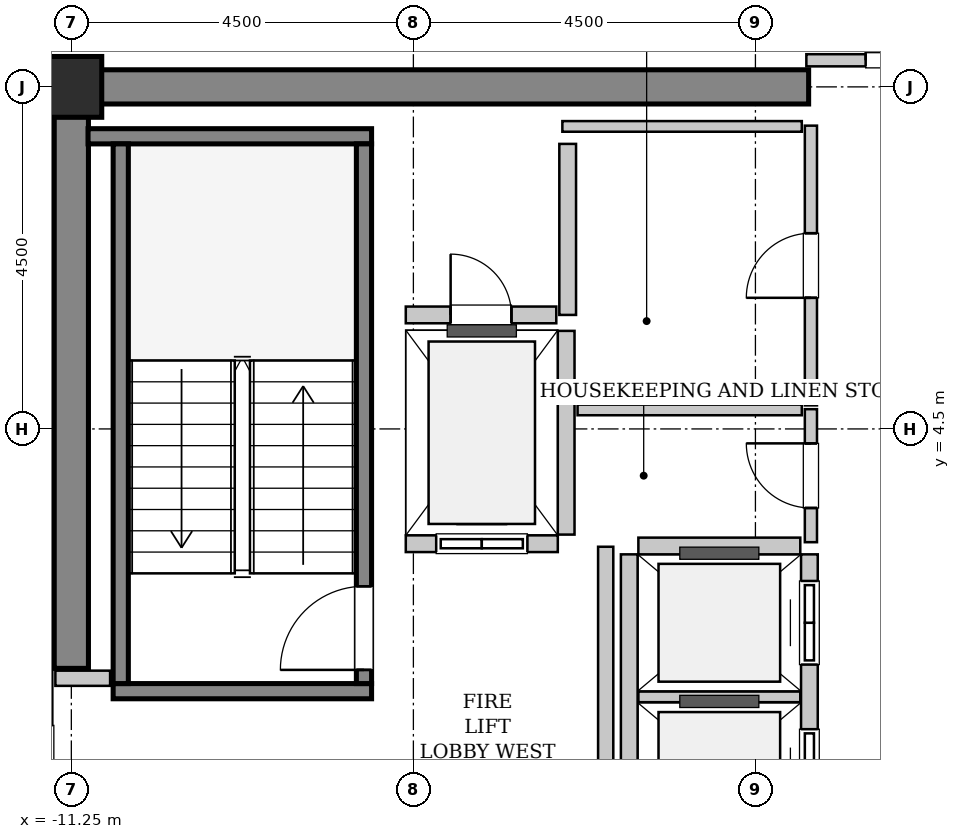
"""IFC4 building model, lengths in metres.
Left out: names, types, materials, properties, quantities, classifications, styles, units other than length and angle.
Written with IfcOpenShell. Run it as: python <this file> out.ifc"""

import sys

from ifc_helpers import new_model, si_unit, direction, frame, frame_2d, origin, origin_2d, place, context, subcontext, project, spatial, rectangle, hollow_rectangle, extrude, source, transform, mapped, element, fill, save


model = new_model("IFC4")
c1 = context("Model", 3, precision=1e-05, world=origin(), true_north=direction((0.0, 1.0)))
c2 = subcontext(c1, "Body", "Model", "MODEL_VIEW")
j1 = project(units=[si_unit("LENGTHUNIT", "METRE"), si_unit("PLANEANGLEUNIT", "RADIAN")], contexts=[c1])
p1 = place(None, origin())
s1 = spatial("IfcSite", under=j1, at=p1, CompositionType="ELEMENT")
p2 = place(p1, origin())
s2 = spatial("IfcBuilding", under=s1, at=p2, CompositionType="ELEMENT")
p3 = place(p2, frame((0.0, 0.0, 268.4)))
s3 = spatial("IfcBuildingStorey", under=s2, at=p3, CompositionType="ELEMENT", Elevation=268.4)
m1 = source(origin(), c2, "Body", "SweptSolid", [
    extrude(rectangle(XDim=9.925, YDim=0.45, at=frame_2d((4.962, 0.0))), origin(), (0.0, 0.0, 1.0), 3.8),
])
p4 = place(p3, frame((-11.475, 9.0, 0.0), z_axis=(0.0, 0.0, 1.0), x_axis=(1.0, 0.0, 0.0)))
e1 = element("IfcWall", 1, at=p4, inside=s3, PredefinedType="SHEAR", context=c2, shape_type="MappedRepresentation", body=[
    mapped(m1, transform((0.0, 0.0, 0.0), x_axis=(1.0, 0.0, 0.0), y_axis=(0.0, 1.0, 0.0), z_axis=(0.0, 0.0, 1.0), scale=1.0)),
])
m2 = source(origin(), c2, "Body", "SweptSolid", [
    extrude(rectangle(XDim=7.425, YDim=0.45, at=frame_2d((3.712, 0.0))), origin(), (0.0, 0.0, 1.0), 3.8),
])
p5 = place(p3, frame((-11.25, 1.35, 0.0), z_axis=(0.0, 0.0, 1.0), x_axis=(0.0, 1.0, 0.0)))
e2 = element("IfcWall", 2, at=p5, inside=s3, PredefinedType="SHEAR", context=c2, shape_type="MappedRepresentation", body=[
    mapped(m2, transform((0.0, 0.0, 0.0), x_axis=(1.0, 0.0, 0.0), y_axis=(0.0, 1.0, 0.0), z_axis=(0.0, 0.0, 1.0), scale=1.0)),
])
m3 = source(origin(), c2, "Body", "SweptSolid", [
    extrude(hollow_rectangle(XDim=0.8, YDim=0.8, WallThickness=0.04, InnerFilletRadius=0.04, OuterFilletRadius=0.08, at=origin_2d()), origin(), (0.0, 0.0, 1.0), 3.8),
])
p6 = place(p3, frame((-11.25, 9.0, 0.0), z_axis=(0.0, 0.0, 1.0), x_axis=(1.0, 0.0, 0.0)))
e3 = element("IfcColumn", 3, at=p6, inside=s3, PredefinedType="COLUMN", context=c2, shape_type="MappedRepresentation", body=[
    mapped(m3, transform((0.0, 0.0, 0.0), x_axis=(1.0, 0.0, 0.0), y_axis=(0.0, 1.0, 0.0), z_axis=(0.0, 0.0, 1.0), scale=1.0)),
])
m4 = source(origin(), c2, "Body", "SweptSolid", [
    extrude(rectangle(XDim=3.4, YDim=0.2, at=frame_2d((1.7, 0.0))), origin(), (0.0, 0.0, 1.0), 3.8),
])
p7 = place(p3, frame((-7.3, 1.05, 0.0), z_axis=(0.0, 0.0, 1.0), x_axis=(-1.0, 0.0, 0.0)))
e4 = element("IfcWall", 4, at=p7, inside=s3, PredefinedType="SOLIDWALL", context=c2, shape_type="MappedRepresentation", body=[
    mapped(m4, transform((0.0, 0.0, 0.0), x_axis=(1.0, 0.0, 0.0), y_axis=(0.0, 1.0, 0.0), z_axis=(0.0, 0.0, 1.0), scale=1.0)),
])
m5 = source(origin(), c2, "Body", "SweptSolid", [
    extrude(rectangle(XDim=3.73, YDim=0.2, at=frame_2d((1.865, 0.0))), origin(), (0.0, 0.0, 1.0), 3.8),
])
p8 = place(p3, frame((-7.3, 8.35, 0.0), z_axis=(0.0, 0.0, 1.0), x_axis=(-1.0, 0.0, 0.0)))
e5 = element("IfcWall", 5, at=p8, inside=s3, PredefinedType="SOLIDWALL", context=c2, shape_type="MappedRepresentation", body=[
    mapped(m5, transform((0.0, 0.0, 0.0), x_axis=(1.0, 0.0, 0.0), y_axis=(0.0, 1.0, 0.0), z_axis=(0.0, 0.0, 1.0), scale=1.0)),
])
m6 = source(origin(), c2, "Body", "SweptSolid", [
    extrude(rectangle(XDim=7.1, YDim=0.2, at=frame_2d((3.55, 0.0))), origin(), (0.0, 0.0, 1.0), 3.8),
])
p9 = place(p3, frame((-7.4, 1.15, 0.0), z_axis=(0.0, 0.0, 1.0), x_axis=(0.0, 1.0, 0.0)))
e6 = element("IfcWall", 6, at=p9, inside=s3, PredefinedType="SOLIDWALL", context=c2, shape_type="MappedRepresentation", body=[
    mapped(m6, transform((0.0, 0.0, 0.0), x_axis=(1.0, 0.0, 0.0), y_axis=(0.0, 1.0, 0.0), z_axis=(0.0, 0.0, 1.0), scale=1.0)),
])
p10 = place(p9, frame((0.18, 0.0, 0.0)))
e7 = element("IfcOpeningElement", 7, at=p10, cuts=e6, PredefinedType="OPENING", context=c2, shape_type="SweptSolid", body=[
    extrude(rectangle(XDim=1.1, YDim=2.15, at=frame_2d((0.55, 1.075))), frame((0.0, 0.11, 0.0), z_axis=(0.0, -1.0, 0.0), x_axis=(1.0, 0.0, 0.0)), (0.0, 0.0, 1.0), 0.22),
])
p11 = place(p3, frame((-10.6, 1.15, 0.0), z_axis=(0.0, 0.0, 1.0), x_axis=(0.0, 1.0, 0.0)))
e8 = element("IfcWall", 8, at=p11, inside=s3, PredefinedType="SOLIDWALL", context=c2, shape_type="MappedRepresentation", body=[
    mapped(m6, transform((0.0, 0.0, 0.0), x_axis=(1.0, 0.0, 0.0), y_axis=(0.0, 1.0, 0.0), z_axis=(0.0, 0.0, 1.0), scale=1.0)),
])
m7 = source(origin(), c2, "Body", "SweptSolid", [
    extrude(rectangle(XDim=2.0, YDim=0.22, at=frame_2d((1.0, 0.0))), origin(), (0.0, 0.0, 1.0), 3.535),
])
p12 = place(p3, frame((-6.85, 2.99, 0.0), z_axis=(0.0, 0.0, 1.0), x_axis=(1.0, 0.0, 0.0)))
e9 = element("IfcWall", 9, at=p12, inside=s3, PredefinedType="SOLIDWALL", context=c2, shape_type="MappedRepresentation", body=[
    mapped(m7, transform((0.0, 0.0, 0.0), x_axis=(1.0, 0.0, 0.0), y_axis=(0.0, 1.0, 0.0), z_axis=(0.0, 0.0, 1.0), scale=1.0)),
])
p13 = place(p12, frame((0.4, 0.0, 0.0)))
e10 = element("IfcOpeningElement", 10, at=p13, cuts=e9, PredefinedType="OPENING", context=c2, shape_type="SweptSolid", body=[
    extrude(rectangle(XDim=1.2, YDim=2.2, at=frame_2d((0.6, 1.1))), frame((0.0, 0.12, 0.0), z_axis=(0.0, -1.0, 0.0), x_axis=(1.0, 0.0, 0.0)), (0.0, 0.0, 1.0), 0.24),
])
m8 = source(origin(), c2, "Body", "SweptSolid", [
    extrude(rectangle(XDim=2.68, YDim=0.22, at=frame_2d((1.34, 0.0))), origin(), (0.0, 0.0, 1.0), 3.535),
])
p14 = place(p3, frame((-4.74, 3.11, 0.0), z_axis=(0.0, 0.0, 1.0), x_axis=(0.0, 1.0, 0.0)))
e11 = element("IfcWall", 11, at=p14, inside=s3, PredefinedType="SOLIDWALL", context=c2, shape_type="MappedRepresentation", body=[
    mapped(m8, transform((0.0, 0.0, 0.0), x_axis=(1.0, 0.0, 0.0), y_axis=(0.0, 1.0, 0.0), z_axis=(0.0, 0.0, 1.0), scale=1.0)),
])
m9 = source(origin(), c2, "Body", "SweptSolid", [
    extrude(rectangle(XDim=5.7, YDim=0.22, at=frame_2d((2.85, 0.0))), origin(), (0.0, 0.0, 1.0), 3.535),
])
p15 = place(p3, frame((-1.54, -2.85, 0.0), z_axis=(0.0, 0.0, 1.0), x_axis=(0.0, 1.0, 0.0)))
e12 = element("IfcWall", 12, at=p15, inside=s3, PredefinedType="SOLIDWALL", context=c2, shape_type="MappedRepresentation", body=[
    mapped(m9, transform((0.0, 0.0, 0.0), x_axis=(1.0, 0.0, 0.0), y_axis=(0.0, 1.0, 0.0), z_axis=(0.0, 0.0, 1.0), scale=1.0)),
])
p16 = place(p15, frame((0.35, 0.0, 0.0)))
e13 = element("IfcOpeningElement", 13, at=p16, cuts=e12, PredefinedType="OPENING", context=c2, shape_type="SweptSolid", body=[
    extrude(rectangle(XDim=1.1, YDim=2.2, at=frame_2d((0.55, 1.1))), frame((0.0, 0.12, 0.0), z_axis=(0.0, -1.0, 0.0), x_axis=(1.0, 0.0, 0.0)), (0.0, 0.0, 1.0), 0.24),
])
p17 = place(p15, frame((2.3, 0.0, 0.0)))
e14 = element("IfcOpeningElement", 14, at=p17, cuts=e12, PredefinedType="OPENING", context=c2, shape_type="SweptSolid", body=[
    extrude(rectangle(XDim=1.1, YDim=2.2, at=frame_2d((0.55, 1.1))), frame((0.0, 0.12, 0.0), z_axis=(0.0, -1.0, 0.0), x_axis=(1.0, 0.0, 0.0)), (0.0, 0.0, 1.0), 0.24),
])
p18 = place(p15, frame((4.25, 0.0, 0.0)))
e15 = element("IfcOpeningElement", 15, at=p18, cuts=e12, PredefinedType="OPENING", context=c2, shape_type="SweptSolid", body=[
    extrude(rectangle(XDim=1.1, YDim=2.2, at=frame_2d((0.55, 1.1))), frame((0.0, 0.12, 0.0), z_axis=(0.0, -1.0, 0.0), x_axis=(1.0, 0.0, 0.0)), (0.0, 0.0, 1.0), 0.24),
])
p19 = place(p3, frame((-3.91, 2.85, 0.0), z_axis=(0.0, 0.0, 1.0), x_axis=(0.0, -1.0, 0.0)))
e16 = element("IfcWall", 16, at=p19, inside=s3, PredefinedType="SOLIDWALL", context=c2, shape_type="MappedRepresentation", body=[
    mapped(m9, transform((0.0, 0.0, 0.0), x_axis=(1.0, 0.0, 0.0), y_axis=(0.0, 1.0, 0.0), z_axis=(0.0, 0.0, 1.0), scale=1.0)),
])
m10 = source(origin(), c2, "Body", "SweptSolid", [
    extrude(rectangle(XDim=2.13, YDim=0.14, at=frame_2d((1.065, 0.0))), origin(), (0.0, 0.0, 1.0), 3.535),
])
p20 = place(p3, frame((-3.79, 0.975, 0.0), z_axis=(0.0, 0.0, 1.0), x_axis=(1.0, 0.0, 0.0)))
e17 = element("IfcWall", 17, at=p20, inside=s3, PredefinedType="PARTITIONING", context=c2, shape_type="MappedRepresentation", body=[
    mapped(m10, transform((0.0, 0.0, 0.0), x_axis=(1.0, 0.0, 0.0), y_axis=(0.0, 1.0, 0.0), z_axis=(0.0, 0.0, 1.0), scale=1.0)),
])
m11 = source(origin(), c2, "Body", "SweptSolid", [
    extrude(rectangle(XDim=2.13, YDim=0.22, at=frame_2d((1.065, 0.0))), origin(), (0.0, 0.0, 1.0), 3.535),
])
p21 = place(p3, frame((-1.66, 2.96, 0.0), z_axis=(0.0, 0.0, 1.0), x_axis=(-1.0, 0.0, 0.0)))
e18 = element("IfcWall", 18, at=p21, inside=s3, PredefinedType="SOLIDWALL", context=c2, shape_type="MappedRepresentation", body=[
    mapped(m11, transform((0.0, 0.0, 0.0), x_axis=(1.0, 0.0, 0.0), y_axis=(0.0, 1.0, 0.0), z_axis=(0.0, 0.0, 1.0), scale=1.0)),
])
m12 = source(origin(), c2, "Body", "SweptSolid", [
    extrude(rectangle(XDim=2.25, YDim=0.22, at=frame_2d((1.125, 0.0))), origin(), (0.0, 0.0, 1.0), 3.535),
])
p22 = place(p3, frame((-4.72, 6.0, 0.0), z_axis=(0.0, 0.0, 1.0), x_axis=(0.0, 1.0, 0.0)))
e19 = element("IfcWall", 19, at=p22, inside=s3, PredefinedType="SOLIDWALL", context=c2, shape_type="MappedRepresentation", body=[
    mapped(m12, transform((0.0, 0.0, 0.0), x_axis=(1.0, 0.0, 0.0), y_axis=(0.0, 1.0, 0.0), z_axis=(0.0, 0.0, 1.0), scale=1.0)),
])
m13 = source(origin(), c2, "Body", "SweptSolid", [
    extrude(rectangle(XDim=1.98, YDim=0.22, at=frame_2d((0.99, 0.0))), origin(), (0.0, 0.0, 1.0), 3.535),
])
p23 = place(p3, frame((-6.85, 6.0, 0.0), z_axis=(0.0, 0.0, 1.0), x_axis=(1.0, 0.0, 0.0)))
e20 = element("IfcWall", 20, at=p23, inside=s3, PredefinedType="SOLIDWALL", context=c2, shape_type="MappedRepresentation", body=[
    mapped(m13, transform((0.0, 0.0, 0.0), x_axis=(1.0, 0.0, 0.0), y_axis=(0.0, 1.0, 0.0), z_axis=(0.0, 0.0, 1.0), scale=1.0)),
])
p24 = place(p23, frame((0.59, 0.0, 0.0)))
e21 = element("IfcOpeningElement", 21, at=p24, cuts=e20, PredefinedType="OPENING", context=c2, shape_type="SweptSolid", body=[
    extrude(rectangle(XDim=0.8, YDim=2.0, at=frame_2d((0.4, 1.0))), frame((0.0, 0.12, 0.0), z_axis=(0.0, -1.0, 0.0), x_axis=(1.0, 0.0, 0.0)), (0.0, 0.0, 1.0), 0.24),
])
m14 = source(origin(), c2, "Body", "SweptSolid", [
    extrude(rectangle(XDim=5.9, YDim=0.2, at=frame_2d((2.95, 0.0))), origin(), (0.0, 0.0, 1.0), 3.535),
])
p25 = place(p3, frame((-4.22, -2.95, 0.0), z_axis=(0.0, 0.0, 1.0), x_axis=(0.0, 1.0, 0.0)))
e22 = element("IfcWall", 22, at=p25, inside=s3, PredefinedType="PARTITIONING", context=c2, shape_type="MappedRepresentation", body=[
    mapped(m14, transform((0.0, 0.0, 0.0), x_axis=(1.0, 0.0, 0.0), y_axis=(0.0, 1.0, 0.0), z_axis=(0.0, 0.0, 1.0), scale=1.0)),
])
m15 = source(origin(), c2, "Body", "SweptSolid", [
    extrude(rectangle(XDim=0.72, YDim=0.2, at=frame_2d((0.36, 0.0))), origin(), (0.0, 0.0, 1.0), 3.535),
])
p26 = place(p3, frame((-11.46, 1.22, 0.0), z_axis=(0.0, 0.0, 1.0), x_axis=(1.0, 0.0, 0.0)))
e23 = element("IfcWall", 23, at=p26, inside=s3, PredefinedType="PARTITIONING", context=c2, shape_type="MappedRepresentation", body=[
    mapped(m15, transform((0.0, 0.0, 0.0), x_axis=(1.0, 0.0, 0.0), y_axis=(0.0, 1.0, 0.0), z_axis=(0.0, 0.0, 1.0), scale=1.0)),
])
m16 = source(origin(), c2, "Body", "SweptSolid", [
    extrude(rectangle(XDim=3.16, YDim=0.16, at=frame_2d((1.58, 0.0))), origin(), (0.0, 0.0, 1.0), 2.625),
])
p27 = place(p3, frame((-1.58, 9.35, 0.0), z_axis=(0.0, 0.0, 1.0), x_axis=(1.0, 0.0, 0.0)))
e24 = element("IfcWall", 24, at=p27, inside=s3, PredefinedType="PARTITIONING", context=c2, shape_type="MappedRepresentation", body=[
    mapped(m16, transform((0.0, 0.0, 0.0), x_axis=(1.0, 0.0, 0.0), y_axis=(0.0, 1.0, 0.0), z_axis=(0.0, 0.0, 1.0), scale=1.0)),
])
p28 = place(p27, frame((0.78, 0.0, 0.0)))
e25 = element("IfcOpeningElement", 25, at=p28, cuts=e24, PredefinedType="OPENING", context=c2, shape_type="SweptSolid", body=[
    extrude(rectangle(XDim=1.6, YDim=2.3, at=frame_2d((0.8, 1.15))), frame((0.0, 0.09, 0.0), z_axis=(0.0, -1.0, 0.0), x_axis=(1.0, 0.0, 0.0)), (0.0, 0.0, 1.0), 0.18),
])
m17 = source(origin(), c2, "Body", "SweptSolid", [
    extrude(rectangle(XDim=1.75, YDim=0.16, at=frame_2d((0.875, 0.0))), origin(), (0.0, 0.0, 1.0), 3.535),
])
p29 = place(p3, frame((-1.52, 3.01, 0.0), z_axis=(0.0, 0.0, 1.0), x_axis=(0.0, 1.0, 0.0)))
e26 = element("IfcWall", 26, at=p29, inside=s3, PredefinedType="PARTITIONING", context=c2, shape_type="MappedRepresentation", body=[
    mapped(m17, transform((0.0, 0.0, 0.0), x_axis=(1.0, 0.0, 0.0), y_axis=(0.0, 1.0, 0.0), z_axis=(0.0, 0.0, 1.0), scale=1.0)),
])
p30 = place(p29, frame((0.45, 0.0, 0.0)))
e27 = element("IfcOpeningElement", 27, at=p30, cuts=e26, PredefinedType="OPENING", context=c2, shape_type="SweptSolid", body=[
    extrude(rectangle(XDim=0.85, YDim=2.1, at=frame_2d((0.425, 1.05))), frame((0.0, 0.09, 0.0), z_axis=(0.0, -1.0, 0.0), x_axis=(1.0, 0.0, 0.0)), (0.0, 0.0, 1.0), 0.18),
])
m18 = source(origin(), c2, "Body", "SweptSolid", [
    extrude(rectangle(XDim=2.95, YDim=0.14, at=frame_2d((1.475, 0.0))), origin(), (0.0, 0.0, 1.0), 3.535),
])
p31 = place(p3, frame((-4.59, 4.75, 0.0), z_axis=(0.0, 0.0, 1.0), x_axis=(1.0, 0.0, 0.0)))
e28 = element("IfcWall", 28, at=p31, inside=s3, PredefinedType="PARTITIONING", context=c2, shape_type="MappedRepresentation", body=[
    mapped(m18, transform((0.0, 0.0, 0.0), x_axis=(1.0, 0.0, 0.0), y_axis=(0.0, 1.0, 0.0), z_axis=(0.0, 0.0, 1.0), scale=1.0)),
])
m19 = source(origin(), c2, "Body", "SweptSolid", [
    extrude(rectangle(XDim=3.68, YDim=0.16, at=frame_2d((1.84, 0.0))), origin(), (0.0, 0.0, 1.0), 3.535),
])
p32 = place(p3, frame((-1.52, 4.81, 0.0), z_axis=(0.0, 0.0, 1.0), x_axis=(0.0, 1.0, 0.0)))
e29 = element("IfcWall", 29, at=p32, inside=s3, PredefinedType="PARTITIONING", context=c2, shape_type="MappedRepresentation", body=[
    mapped(m19, transform((0.0, 0.0, 0.0), x_axis=(1.0, 0.0, 0.0), y_axis=(0.0, 1.0, 0.0), z_axis=(0.0, 0.0, 1.0), scale=1.0)),
])
p33 = place(p32, frame((1.415, 0.0, 0.0)))
e30 = element("IfcOpeningElement", 30, at=p33, cuts=e29, PredefinedType="OPENING", context=c2, shape_type="SweptSolid", body=[
    extrude(rectangle(XDim=0.85, YDim=2.1, at=frame_2d((0.425, 1.05))), frame((0.0, 0.09, 0.0), z_axis=(0.0, -1.0, 0.0), x_axis=(1.0, 0.0, 0.0)), (0.0, 0.0, 1.0), 0.18),
])
m20 = source(origin(), c2, "Body", "SweptSolid", [
    extrude(rectangle(XDim=3.15, YDim=0.14, at=frame_2d((1.575, 0.0))), origin(), (0.0, 0.0, 1.0), 3.535),
])
p34 = place(p3, frame((-4.79, 8.48, 0.0), z_axis=(0.0, 0.0, 1.0), x_axis=(1.0, 0.0, 0.0)))
e31 = element("IfcWall", 31, at=p34, inside=s3, PredefinedType="PARTITIONING", context=c2, shape_type="MappedRepresentation", body=[
    mapped(m20, transform((0.0, 0.0, 0.0), x_axis=(1.0, 0.0, 0.0), y_axis=(0.0, 1.0, 0.0), z_axis=(0.0, 0.0, 1.0), scale=1.0)),
])
m21 = source(origin(), c2, "Body", "SweptSolid", [
    extrude(rectangle(XDim=1.1, YDim=2.15, at=frame_2d((0.55, 1.075))), frame((0.0, 0.025, 0.0), z_axis=(0.0, -1.0, 0.0), x_axis=(1.0, 0.0, 0.0)), (0.0, 0.0, 1.0), 0.05),
])
p35 = place(p10, origin())
e32 = element("IfcDoor", 32, at=p35, inside=s3, OperationType="SINGLE_SWING_LEFT", PredefinedType="DOOR", context=c2, shape_type="MappedRepresentation", body=[
    mapped(m21, transform((0.0, 0.0, 0.0), x_axis=(1.0, 0.0, 0.0), y_axis=(0.0, 1.0, 0.0), z_axis=(0.0, 0.0, 1.0), scale=1.0)),
])
fill(e7, e32)
m22 = source(origin(), c2, "Body", "SweptSolid", [
    extrude(rectangle(XDim=1.2, YDim=2.2, at=frame_2d((0.6, 1.1))), frame((0.0, 0.025, 0.0), z_axis=(0.0, -1.0, 0.0), x_axis=(1.0, 0.0, 0.0)), (0.0, 0.0, 1.0), 0.05),
])
p36 = place(p13, origin())
e33 = element("IfcDoor", 33, at=p36, inside=s3, OperationType="SLIDING_TO_LEFT", PredefinedType="DOOR", context=c2, shape_type="MappedRepresentation", body=[
    mapped(m22, transform((0.0, 0.0, 0.0), x_axis=(1.0, 0.0, 0.0), y_axis=(0.0, 1.0, 0.0), z_axis=(0.0, 0.0, 1.0), scale=1.0)),
])
fill(e10, e33)
m23 = source(origin(), c2, "Body", "SweptSolid", [
    extrude(rectangle(XDim=1.1, YDim=2.2, at=frame_2d((0.55, 1.1))), frame((0.0, 0.025, 0.0), z_axis=(0.0, -1.0, 0.0), x_axis=(1.0, 0.0, 0.0)), (0.0, 0.0, 1.0), 0.05),
])
p37 = place(p17, origin())
e34 = element("IfcDoor", 34, at=p37, inside=s3, OperationType="DOUBLE_DOOR_SLIDING", PredefinedType="DOOR", context=c2, shape_type="MappedRepresentation", body=[
    mapped(m23, transform((0.0, 0.0, 0.0), x_axis=(1.0, 0.0, 0.0), y_axis=(0.0, 1.0, 0.0), z_axis=(0.0, 0.0, 1.0), scale=1.0)),
])
fill(e14, e34)
p38 = place(p18, origin())
e35 = element("IfcDoor", 35, at=p38, inside=s3, OperationType="DOUBLE_DOOR_SLIDING", PredefinedType="DOOR", context=c2, shape_type="MappedRepresentation", body=[
    mapped(m23, transform((0.0, 0.0, 0.0), x_axis=(1.0, 0.0, 0.0), y_axis=(0.0, 1.0, 0.0), z_axis=(0.0, 0.0, 1.0), scale=1.0)),
])
fill(e15, e35)
m24 = source(origin(), c2, "Body", "SweptSolid", [
    extrude(rectangle(XDim=0.8, YDim=2.0, at=frame_2d((0.4, 1.0))), frame((0.0, 0.025, 0.0), z_axis=(0.0, -1.0, 0.0), x_axis=(1.0, 0.0, 0.0)), (0.0, 0.0, 1.0), 0.05),
])
p39 = place(p24, origin())
e36 = element("IfcDoor", 36, at=p39, inside=s3, OperationType="SINGLE_SWING_LEFT", PredefinedType="TRAPDOOR", context=c2, shape_type="MappedRepresentation", body=[
    mapped(m24, transform((0.0, 0.0, 0.0), x_axis=(1.0, 0.0, 0.0), y_axis=(0.0, 1.0, 0.0), z_axis=(0.0, 0.0, 1.0), scale=1.0)),
])
fill(e21, e36)
m25 = source(origin(), c2, "Body", "SweptSolid", [
    extrude(rectangle(XDim=1.6, YDim=2.3, at=frame_2d((0.8, 1.15))), frame((0.0, 0.025, 0.0), z_axis=(0.0, -1.0, 0.0), x_axis=(1.0, 0.0, 0.0)), (0.0, 0.0, 1.0), 0.05),
])
p40 = place(p28, origin())
e37 = element("IfcDoor", 37, at=p40, inside=s3, OperationType="DOUBLE_DOOR_SINGLE_SWING", PredefinedType="DOOR", context=c2, shape_type="MappedRepresentation", body=[
    mapped(m25, transform((0.0, 0.0, 0.0), x_axis=(1.0, 0.0, 0.0), y_axis=(0.0, 1.0, 0.0), z_axis=(0.0, 0.0, 1.0), scale=1.0)),
])
fill(e25, e37)
m26 = source(origin(), c2, "Body", "SweptSolid", [
    extrude(rectangle(XDim=0.85, YDim=2.1, at=frame_2d((0.425, 1.05))), frame((0.0, 0.025, 0.0), z_axis=(0.0, -1.0, 0.0), x_axis=(1.0, 0.0, 0.0)), (0.0, 0.0, 1.0), 0.05),
])
p41 = place(p30, origin())
e38 = element("IfcDoor", 38, at=p41, inside=s3, OperationType="SINGLE_SWING_RIGHT", PredefinedType="DOOR", context=c2, shape_type="MappedRepresentation", body=[
    mapped(m26, transform((0.0, 0.0, 0.0), x_axis=(1.0, 0.0, 0.0), y_axis=(0.0, 1.0, 0.0), z_axis=(0.0, 0.0, 1.0), scale=1.0)),
])
fill(e27, e38)
p42 = place(p33, origin())
e39 = element("IfcDoor", 39, at=p42, inside=s3, OperationType="SINGLE_SWING_LEFT", PredefinedType="DOOR", context=c2, shape_type="MappedRepresentation", body=[
    mapped(m26, transform((0.0, 0.0, 0.0), x_axis=(1.0, 0.0, 0.0), y_axis=(0.0, 1.0, 0.0), z_axis=(0.0, 0.0, 1.0), scale=1.0)),
])
fill(e30, e39)
save(model, sys.argv[1])
